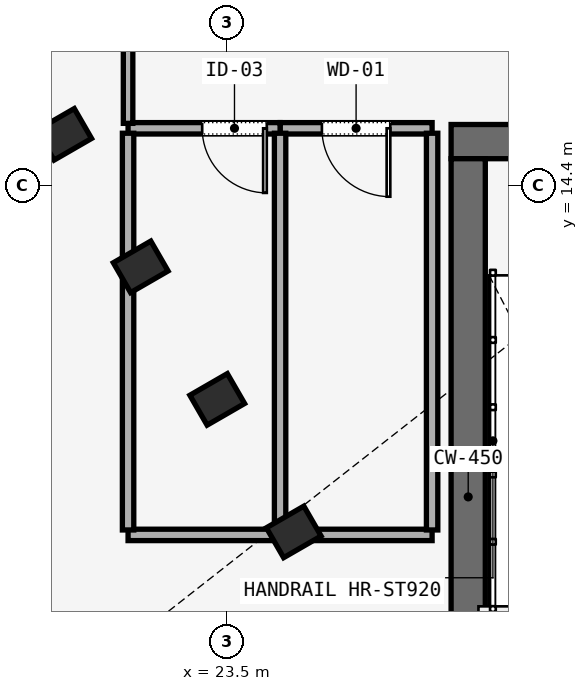
"""IFC4 building model, lengths in metres.
Left out: names, types, materials, properties, quantities, classifications, styles, units other than length and angle.
Written with IfcOpenShell. Run it as: python <this file> out.ifc"""

import sys

from ifc_helpers import new_model, si_unit, direction, frame, frame_2d, origin, origin_2d, place, context, subcontext, project, spatial, rectangle, i_section, extrude, element, fill, save


model = new_model("IFC4")
c1 = context("Model", 3, precision=1e-05, world=origin(), true_north=direction((0.0, 1.0)))
c2 = subcontext(c1, "Body", "Model", "MODEL_VIEW")
j1 = project(units=[si_unit("LENGTHUNIT", "METRE"), si_unit("PLANEANGLEUNIT", "RADIAN")], contexts=[c1])
p1 = place(None, origin())
s1 = spatial("IfcSite", under=j1, at=p1, CompositionType="ELEMENT")
p2 = place(p1, origin())
s2 = spatial("IfcBuilding", under=s1, at=p2, CompositionType="ELEMENT")
p3 = place(p2, frame((0.0, 0.0, 30.0)))
s3 = spatial("IfcBuildingStorey", under=s2, at=p3, CompositionType="ELEMENT", Elevation=30.0)
p4 = place(p3, frame((26.45, 14.975, 0.0), z_axis=(0.0, 0.0, 1.0), x_axis=(1.0, 0.0, 0.0)))
e1 = element("IfcWall", 1, at=p4, inside=s3, PredefinedType="SOLIDWALL", context=c2, shape_type="SweptSolid", body=[
    extrude(rectangle(XDim=31.1, YDim=0.45, at=frame_2d((15.55, 0.0))), origin(), (0.0, 0.0, 1.0), 5.78),
])
p5 = place(p4, frame((1.65, 0.0, 0.0)))
e2 = element("IfcOpeningElement", 2, at=p5, cuts=e1, PredefinedType="OPENING", context=c2, shape_type="SweptSolid", body=[
    extrude(rectangle(XDim=1.1, YDim=2.2, at=frame_2d((0.55, 1.1))), frame((0.0, 0.225, 0.0), z_axis=(0.0, -1.0, 0.0), x_axis=(1.0, 0.0, 0.0)), (0.0, 0.0, 1.0), 0.45),
])
p6 = place(p4, frame((13.65, 0.0, 0.0)))
e3 = element("IfcOpeningElement", 3, at=p6, cuts=e1, PredefinedType="OPENING", context=c2, shape_type="SweptSolid", body=[
    extrude(rectangle(XDim=1.1, YDim=2.2, at=frame_2d((0.55, 1.1))), frame((0.0, 0.225, 0.0), z_axis=(0.0, -1.0, 0.0), x_axis=(1.0, 0.0, 0.0)), (0.0, 0.0, 1.0), 0.45),
])
p7 = place(p4, frame((25.55, 0.0, 0.0)))
e4 = element("IfcOpeningElement", 4, at=p7, cuts=e1, PredefinedType="OPENING", context=c2, shape_type="SweptSolid", body=[
    extrude(rectangle(XDim=1.1, YDim=2.2, at=frame_2d((0.55, 1.1))), frame((0.0, 0.225, 0.0), z_axis=(0.0, -1.0, 0.0), x_axis=(1.0, 0.0, 0.0)), (0.0, 0.0, 1.0), 0.45),
])
p8 = place(p4, frame((10.7, 0.0, 0.0)))
e5 = element("IfcOpeningElement", 5, at=p8, cuts=e1, PredefinedType="OPENING", context=c2, shape_type="SweptSolid", body=[
    extrude(rectangle(XDim=1.4, YDim=2.2, at=frame_2d((0.7, 1.1))), frame((0.0, 0.225, 0.0), z_axis=(0.0, -1.0, 0.0), x_axis=(1.0, 0.0, 0.0)), (0.0, 0.0, 1.0), 0.45),
])
p9 = place(p4, frame((19.35, 0.0, 0.0)))
e6 = element("IfcOpeningElement", 6, at=p9, cuts=e1, PredefinedType="OPENING", context=c2, shape_type="SweptSolid", body=[
    extrude(rectangle(XDim=1.1, YDim=2.2, at=frame_2d((0.55, 1.1))), frame((0.0, 0.225, 0.0), z_axis=(0.0, -1.0, 0.0), x_axis=(1.0, 0.0, 0.0)), (0.0, 0.0, 1.0), 0.45),
])
p10 = place(p4, frame((21.4, 0.0, 0.0)))
e7 = element("IfcOpeningElement", 7, at=p10, cuts=e1, PredefinedType="OPENING", context=c2, shape_type="SweptSolid", body=[
    extrude(rectangle(XDim=0.9, YDim=2.1, at=frame_2d((0.45, 1.05))), frame((0.0, 0.225, 0.0), z_axis=(0.0, -1.0, 0.0), x_axis=(1.0, 0.0, 0.0)), (0.0, 0.0, 1.0), 0.45),
])
p11 = place(p4, frame((23.35, 0.0, 0.0)))
e8 = element("IfcOpeningElement", 8, at=p11, cuts=e1, PredefinedType="OPENING", context=c2, shape_type="SweptSolid", body=[
    extrude(rectangle(XDim=1.3, YDim=2.3, at=frame_2d((0.65, 1.15))), frame((0.0, 0.225, 0.0), z_axis=(0.0, -1.0, 0.0), x_axis=(1.0, 0.0, 0.0)), (0.0, 0.0, 1.0), 0.45),
])
p12 = place(p3, frame((26.675, 5.85, 0.0), z_axis=(0.0, 0.0, 1.0), x_axis=(0.0, 1.0, 0.0)))
e9 = element("IfcWall", 9, at=p12, inside=s3, PredefinedType="SOLIDWALL", context=c2, shape_type="SweptSolid", body=[
    extrude(rectangle(XDim=8.9, YDim=0.45, at=frame_2d((4.45, 0.0))), origin(), (0.0, 0.0, 1.0), 5.78),
])
for number, where, z_axis, x_axis in (
    (10, (21.359, 15.071, 0.0), (0.0, 0.0, 1.0), (-0.5, 0.866, 0.0)),
    (11, (22.366, 13.327, 0.0), (0.0, 0.0, 1.0), (-0.5, 0.866, 0.0)),
    (12, (23.373, 11.583, 0.0), (0.0, 0.0, 1.0), (-0.5, 0.866, 0.0)),
    (13, (24.38, 9.839, 0.0), (0.0, 0.0, 1.0), (-0.5, 0.866, 0.0)),
):
    element("IfcColumn", number, at=place(p3, frame(where, z_axis=z_axis, x_axis=x_axis)), inside=s3, PredefinedType="COLUMN", context=c2, shape_type="SweptSolid", body=[
        extrude(i_section(OverallWidth=0.454, OverallDepth=0.569, WebThickness=0.078, FlangeThickness=0.08, FilletRadius=0.015, at=origin_2d()), origin(), (0.0, 0.0, 1.0), 6.0),
    ])
p13 = place(p3, frame((26.2, 15.15, 0.0), z_axis=(0.0, 0.0, 1.0), x_axis=(-1.0, 0.0, 0.0)))
e14 = element("IfcWall", 14, at=p13, inside=s3, PredefinedType="PARTITIONING", context=c2, shape_type="SweptSolid", body=[
    extrude(rectangle(XDim=2.0, YDim=0.15, at=frame_2d((1.0, 0.0))), origin(), (0.0, 0.0, 1.0), 5.133),
])
p14 = place(p13, frame((0.55, 0.0, 0.0)))
e15 = element("IfcOpeningElement", 15, at=p14, cuts=e14, PredefinedType="OPENING", context=c2, shape_type="SweptSolid", body=[
    extrude(rectangle(XDim=0.9, YDim=2.15, at=frame_2d((0.45, 1.075))), frame((0.0, 0.075, 0.0), z_axis=(0.0, -1.0, 0.0), x_axis=(1.0, 0.0, 0.0)), (0.0, 0.0, 1.0), 0.15),
])
p15 = place(p3, frame((24.2, 15.15, 0.0), z_axis=(0.0, 0.0, 1.0), x_axis=(-1.0, 0.0, 0.0)))
e16 = element("IfcWall", 16, at=p15, inside=s3, PredefinedType="PARTITIONING", context=c2, shape_type="SweptSolid", body=[
    extrude(rectangle(XDim=2.0, YDim=0.15, at=frame_2d((1.0, 0.0))), origin(), (0.0, 0.0, 1.0), 5.133),
])
p16 = place(p15, frame((0.175, 0.0, 0.0)))
e17 = element("IfcOpeningElement", 17, at=p16, cuts=e16, PredefinedType="OPENING", context=c2, shape_type="SweptSolid", body=[
    extrude(rectangle(XDim=0.85, YDim=2.15, at=frame_2d((0.425, 1.075))), frame((0.0, 0.075, 0.0), z_axis=(0.0, -1.0, 0.0), x_axis=(1.0, 0.0, 0.0)), (0.0, 0.0, 1.0), 0.15),
])
p17 = place(p3, frame((22.2, 15.215, 0.0), z_axis=(0.0, 0.0, 1.0), x_axis=(0.0, 1.0, 0.0)))
e18 = element("IfcWall", 18, at=p17, inside=s3, PredefinedType="PARTITIONING", context=c2, shape_type="SweptSolid", body=[
    extrude(rectangle(XDim=2.085, YDim=0.125, at=frame_2d((1.042, 0.0))), origin(), (0.0, 0.0, 1.0), 5.133),
])
p18 = place(p3, frame((24.2, 9.8, 0.0), z_axis=(0.0, 0.0, 1.0), x_axis=(-1.0, 0.0, 0.0)))
e19 = element("IfcWall", 19, at=p18, inside=s3, PredefinedType="PARTITIONING", context=c2, shape_type="SweptSolid", body=[
    extrude(rectangle(XDim=2.0, YDim=0.15, at=frame_2d((1.0, 0.0))), origin(), (0.0, 0.0, 1.0), 5.133),
])
for number, where, z_axis, x_axis in (
    (20, (22.2, 9.865, 0.0), (0.0, 0.0, 1.0), (0.0, 1.0, 0.0)),
    (21, (24.2, 15.085, 0.0), (0.0, 0.0, 1.0), (0.0, -1.0, 0.0)),
):
    element("IfcWall", number, at=place(p3, frame(where, z_axis=z_axis, x_axis=x_axis)), inside=s3, PredefinedType="PARTITIONING", context=c2, shape_type="SweptSolid", body=[
        extrude(rectangle(XDim=5.22, YDim=0.15, at=frame_2d((2.61, 0.0))), origin(), (0.0, 0.0, 1.0), 5.133),
    ])
p19 = place(p3, frame((26.2, 9.8, 0.0), z_axis=(0.0, 0.0, 1.0), x_axis=(-1.0, 0.0, 0.0)))
e22 = element("IfcWall", 22, at=p19, inside=s3, PredefinedType="PARTITIONING", context=c2, shape_type="SweptSolid", body=[
    extrude(rectangle(XDim=2.0, YDim=0.15, at=frame_2d((1.0, 0.0))), origin(), (0.0, 0.0, 1.0), 5.133),
])
p20 = place(p3, frame((26.2, 15.085, 0.0), z_axis=(0.0, 0.0, 1.0), x_axis=(0.0, -1.0, 0.0)))
e23 = element("IfcWall", 23, at=p20, inside=s3, PredefinedType="PARTITIONING", context=c2, shape_type="SweptSolid", body=[
    extrude(rectangle(XDim=5.22, YDim=0.15, at=frame_2d((2.61, 0.0))), origin(), (0.0, 0.0, 1.0), 5.133),
])
p21 = place(p16, origin())
e24 = element("IfcDoor", 24, at=p21, inside=s3, OperationType="SINGLE_SWING_LEFT", PredefinedType="DOOR", context=c2, shape_type="SweptSolid", body=[
    extrude(rectangle(XDim=0.85, YDim=2.15, at=frame_2d((0.425, 1.075))), frame((0.0, 0.025, 0.0), z_axis=(0.0, -1.0, 0.0), x_axis=(1.0, 0.0, 0.0)), (0.0, 0.0, 1.0), 0.05),
])
fill(e17, e24)
p22 = place(p14, origin())
e25 = element("IfcDoor", 25, at=p22, inside=s3, OperationType="SINGLE_SWING_RIGHT", PredefinedType="DOOR", context=c2, shape_type="SweptSolid", body=[
    extrude(rectangle(XDim=0.9, YDim=2.15, at=frame_2d((0.45, 1.075))), frame((0.0, 0.025, 0.0), z_axis=(0.0, -1.0, 0.0), x_axis=(1.0, 0.0, 0.0)), (0.0, 0.0, 1.0), 0.05),
])
fill(e15, e25)
save(model, sys.argv[1])
